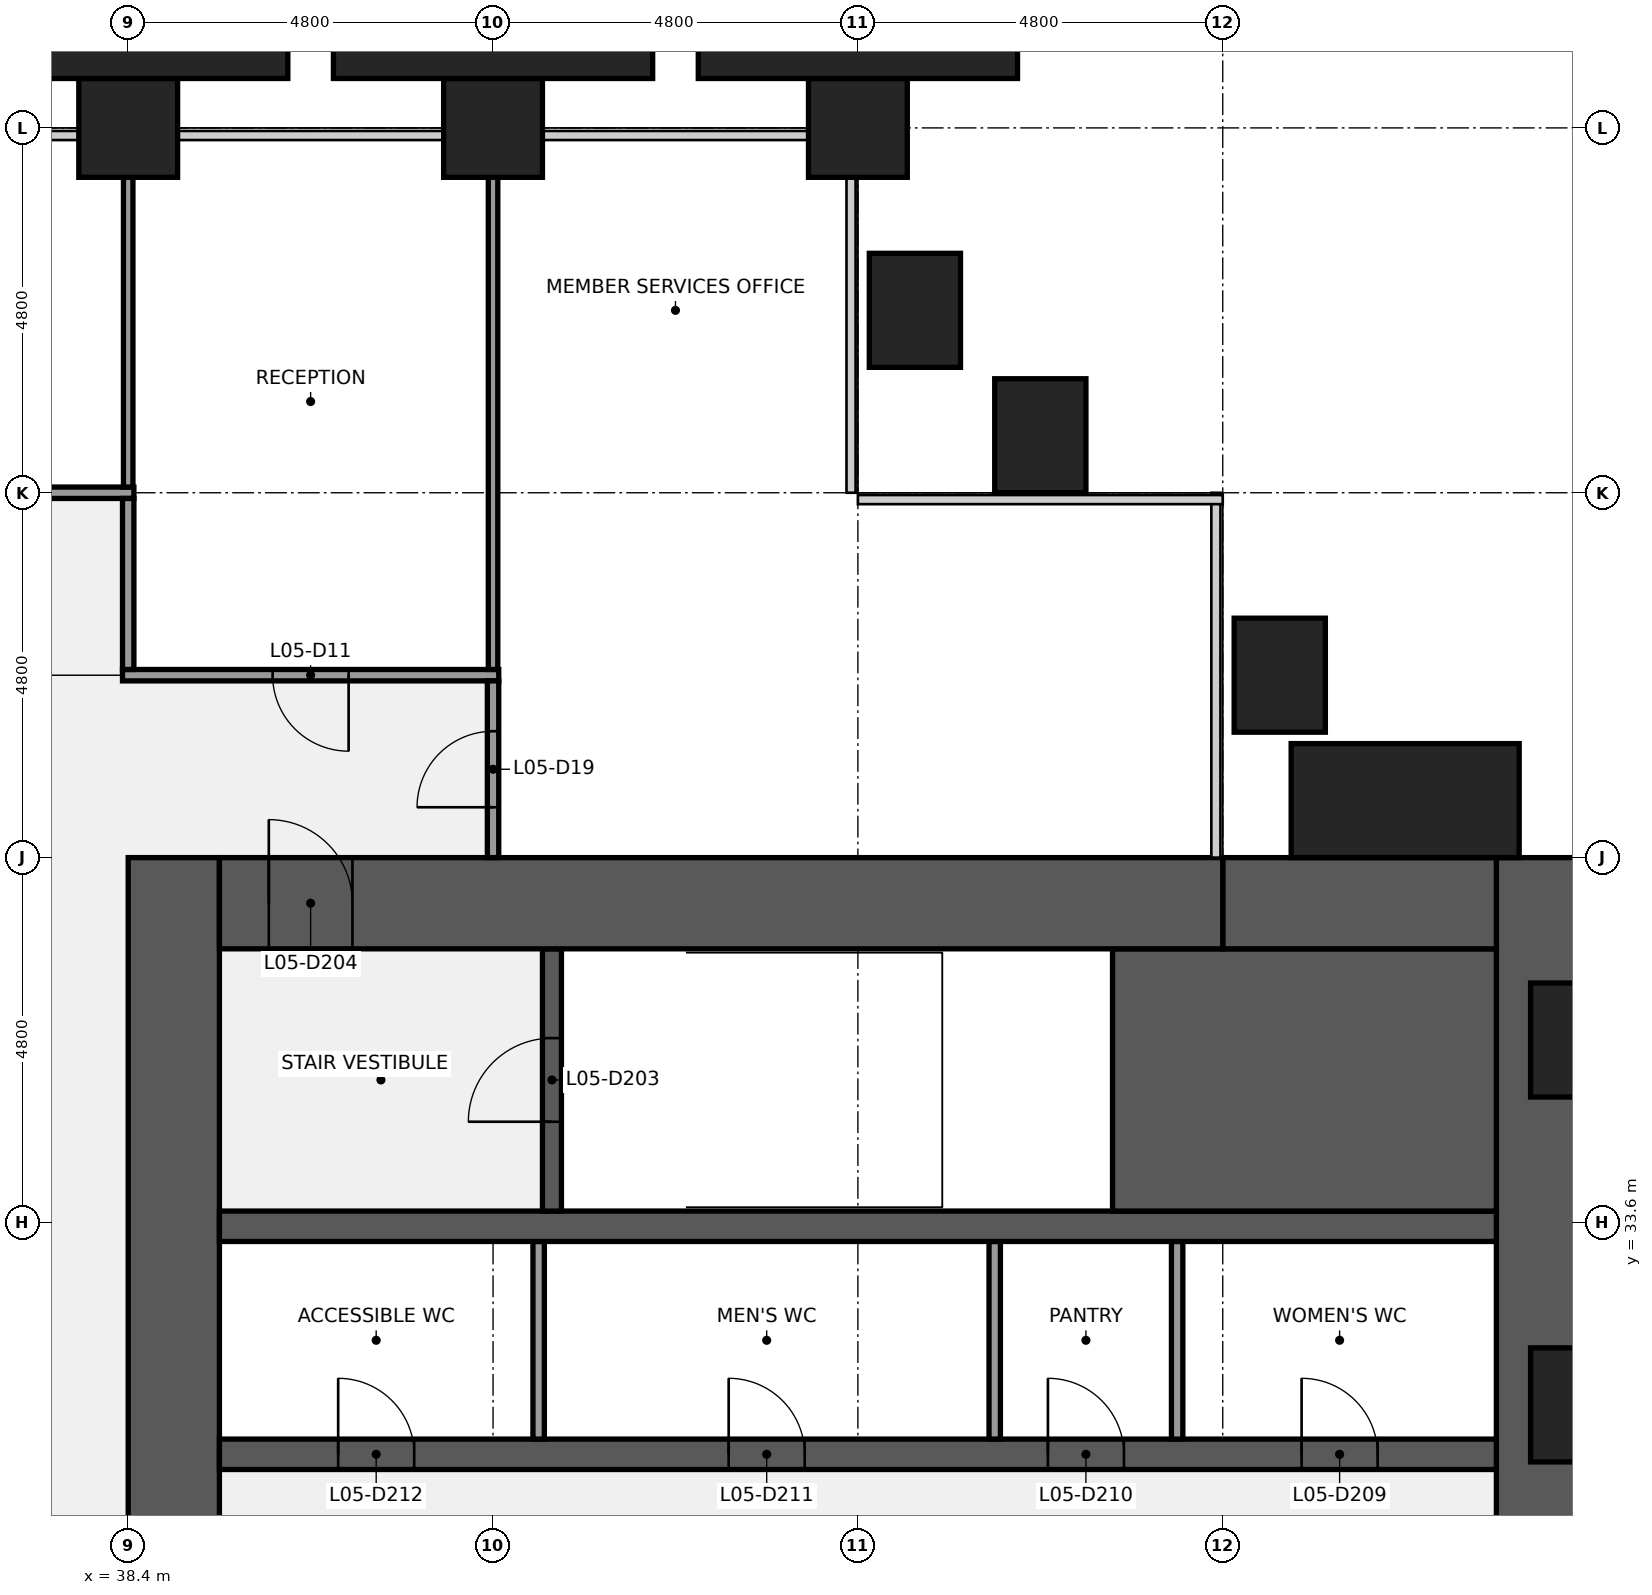
"""IFC4 building model, lengths in metres.
Left out: names, types, materials, properties, quantities, classifications, styles, units other than length and angle.
Written with IfcOpenShell. Run it as: python <this file> out.ifc"""

import sys

from ifc_helpers import new_model, si_unit, direction, frame, frame_2d, origin, origin_2d, place, context, subcontext, project, spatial, rectangle, extrude, element, fill, save


model = new_model("IFC4")
c1 = context("Model", 3, precision=1e-05, world=origin(), true_north=direction((0.0, 1.0)))
c2 = subcontext(c1, "Body", "Model", "MODEL_VIEW")
j1 = project(units=[si_unit("LENGTHUNIT", "METRE"), si_unit("PLANEANGLEUNIT", "RADIAN")], contexts=[c1])
p1 = place(None, origin())
s1 = spatial("IfcSite", under=j1, at=p1, CompositionType="ELEMENT")
p2 = place(p1, origin())
s2 = spatial("IfcBuilding", under=s1, at=p2, CompositionType="ELEMENT")
p3 = place(p2, frame((0.0, 0.0, 30.2)))
s3 = spatial("IfcBuildingStorey", under=s2, at=p3, CompositionType="ELEMENT", Elevation=30.2)
for number, where, z_axis, x_axis in (
    (1, (38.4, 48.0, 0.0), (0.0, 0.0, 1.0), (1.0, 0.0, 0.0)),
    (2, (43.2, 48.0, 0.0), (0.0, 0.0, 1.0), (1.0, 0.0, 0.0)),
    (3, (48.0, 48.0, 0.0), (0.0, 0.0, 1.0), (1.0, 0.0, 0.0)),
):
    element("IfcColumn", number, at=place(p3, frame(where, z_axis=z_axis, x_axis=x_axis)), inside=s3, PredefinedType="COLUMN", context=c2, shape_type="SweptSolid", body=[
        extrude(rectangle(XDim=1.3, YDim=1.3, at=origin_2d()), origin(), (0.0, 0.0, 1.0), 4.4),
    ])
p4 = place(p3, frame((57.0, 38.4, 0.0), z_axis=(0.0, 0.0, 1.0), x_axis=(0.0, -1.0, 0.0)))
e4 = element("IfcWall", 4, at=p4, inside=s3, PredefinedType="SHEAR", context=c2, shape_type="SweptSolid", body=[
    extrude(rectangle(XDim=28.8, YDim=1.2, at=frame_2d((14.4, 0.0))), origin(), (0.0, 0.0, 1.0), 4.24),
])
p5 = place(p4, frame((18.45, 0.0, 0.9)))
e5 = element("IfcOpeningElement", 5, at=p5, cuts=e4, PredefinedType="OPENING", context=c2, shape_type="SweptSolid", body=[
    extrude(rectangle(XDim=1.5, YDim=1.5, at=frame_2d((0.75, 0.75))), frame((0.0, 0.61, 0.0), z_axis=(0.0, -1.0, 0.0), x_axis=(1.0, 0.0, 0.0)), (0.0, 0.0, 1.0), 1.22),
])
p6 = place(p4, frame((8.85, 0.0, 0.9)))
e6 = element("IfcOpeningElement", 6, at=p6, cuts=e4, PredefinedType="OPENING", context=c2, shape_type="SweptSolid", body=[
    extrude(rectangle(XDim=1.5, YDim=1.5, at=frame_2d((0.75, 0.75))), frame((0.0, 0.61, 0.0), z_axis=(0.0, -1.0, 0.0), x_axis=(1.0, 0.0, 0.0)), (0.0, 0.0, 1.0), 1.22),
])
p7 = place(p3, frame((39.0, 9.6, 0.0), z_axis=(0.0, 0.0, 1.0), x_axis=(0.0, 1.0, 0.0)))
e7 = element("IfcWall", 7, at=p7, inside=s3, PredefinedType="SHEAR", context=c2, shape_type="SweptSolid", body=[
    extrude(rectangle(XDim=28.8, YDim=1.2, at=frame_2d((14.4, 0.0))), origin(), (0.0, 0.0, 1.0), 4.24),
])
p8 = place(p7, frame((8.7, 0.0, 0.0)))
e8 = element("IfcOpeningElement", 8, at=p8, cuts=e7, PredefinedType="OPENING", context=c2, shape_type="SweptSolid", body=[
    extrude(rectangle(XDim=1.8, YDim=2.1, at=frame_2d((0.9, 1.05))), frame((0.0, 0.61, 0.0), z_axis=(0.0, -1.0, 0.0), x_axis=(1.0, 0.0, 0.0)), (0.0, 0.0, 1.0), 1.22),
])
p9 = place(p7, frame((18.3, 0.0, 0.0)))
e9 = element("IfcOpeningElement", 9, at=p9, cuts=e7, PredefinedType="OPENING", context=c2, shape_type="SweptSolid", body=[
    extrude(rectangle(XDim=1.8, YDim=2.1, at=frame_2d((0.9, 1.05))), frame((0.0, 0.61, 0.0), z_axis=(0.0, -1.0, 0.0), x_axis=(1.0, 0.0, 0.0)), (0.0, 0.0, 1.0), 1.22),
])
p10 = place(p3, frame((39.6, 30.55, 0.0), z_axis=(0.0, 0.0, 1.0), x_axis=(1.0, 0.0, 0.0)))
e10 = element("IfcWall", 10, at=p10, inside=s3, PredefinedType="SHEAR", context=c2, shape_type="SweptSolid", body=[
    extrude(rectangle(XDim=16.8, YDim=0.4, at=frame_2d((8.4, 0.0))), origin(), (0.0, 0.0, 1.0), 4.24),
])
p11 = place(p10, frame((14.238, 0.0, 0.0)))
e11 = element("IfcOpeningElement", 11, at=p11, cuts=e10, PredefinedType="OPENING", context=c2, shape_type="SweptSolid", body=[
    extrude(rectangle(XDim=1.0, YDim=2.1, at=frame_2d((0.5, 1.05))), frame((0.0, 0.21, 0.0), z_axis=(0.0, -1.0, 0.0), x_axis=(1.0, 0.0, 0.0)), (0.0, 0.0, 1.0), 0.42),
])
p12 = place(p10, frame((10.9, 0.0, 0.0)))
e12 = element("IfcOpeningElement", 12, at=p12, cuts=e10, PredefinedType="OPENING", context=c2, shape_type="SweptSolid", body=[
    extrude(rectangle(XDim=1.0, YDim=2.1, at=frame_2d((0.5, 1.05))), frame((0.0, 0.21, 0.0), z_axis=(0.0, -1.0, 0.0), x_axis=(1.0, 0.0, 0.0)), (0.0, 0.0, 1.0), 0.42),
])
p13 = place(p10, frame((6.7, 0.0, 0.0)))
e13 = element("IfcOpeningElement", 13, at=p13, cuts=e10, PredefinedType="OPENING", context=c2, shape_type="SweptSolid", body=[
    extrude(rectangle(XDim=1.0, YDim=2.1, at=frame_2d((0.5, 1.05))), frame((0.0, 0.21, 0.0), z_axis=(0.0, -1.0, 0.0), x_axis=(1.0, 0.0, 0.0)), (0.0, 0.0, 1.0), 0.42),
])
p14 = place(p10, frame((1.562, 0.0, 0.0)))
e14 = element("IfcOpeningElement", 14, at=p14, cuts=e10, PredefinedType="OPENING", context=c2, shape_type="SweptSolid", body=[
    extrude(rectangle(XDim=1.0, YDim=2.1, at=frame_2d((0.5, 1.05))), frame((0.0, 0.21, 0.0), z_axis=(0.0, -1.0, 0.0), x_axis=(1.0, 0.0, 0.0)), (0.0, 0.0, 1.0), 0.42),
])
for number, where, z_axis, x_axis in (
    (15, (52.2, 30.75, 0.0), (0.0, 0.0, 1.0), (0.0, 1.0, 0.0)),
    (16, (49.8, 30.75, 0.0), (0.0, 0.0, 1.0), (0.0, 1.0, 0.0)),
    (17, (43.8, 30.75, 0.0), (0.0, 0.0, 1.0), (0.0, 1.0, 0.0)),
):
    element("IfcWall", number, at=place(p3, frame(where, z_axis=z_axis, x_axis=x_axis)), inside=s3, PredefinedType="PARTITIONING", context=c2, shape_type="SweptSolid", body=[
        extrude(rectangle(XDim=2.6, YDim=0.15, at=frame_2d((1.3, 0.0))), origin(), (0.0, 0.0, 1.0), 4.24),
    ])
p15 = place(p3, frame((39.6, 33.55, 0.0), z_axis=(0.0, 0.0, 1.0), x_axis=(1.0, 0.0, 0.0)))
e18 = element("IfcWall", 18, at=p15, inside=s3, PredefinedType="SHEAR", context=c2, shape_type="SweptSolid", body=[
    extrude(rectangle(XDim=16.8, YDim=0.4, at=frame_2d((8.4, 0.0))), origin(), (0.0, 0.0, 1.0), 4.24),
])
p16 = place(p3, frame((51.35, 35.475, 0.0), z_axis=(0.0, 0.0, 1.0), x_axis=(1.0, 0.0, 0.0)))
e19 = element("IfcWall", 19, at=p16, inside=s3, PredefinedType="SHEAR", context=c2, shape_type="SweptSolid", body=[
    extrude(rectangle(XDim=5.05, YDim=3.45, at=frame_2d((2.525, 0.0))), origin(), (0.0, 0.0, 1.0), 4.24),
])
p17 = place(p3, frame((43.975, 33.75, 0.0), z_axis=(0.0, 0.0, 1.0), x_axis=(0.0, 1.0, 0.0)))
e20 = element("IfcWall", 20, at=p17, inside=s3, PredefinedType="SHEAR", context=c2, shape_type="SweptSolid", body=[
    extrude(rectangle(XDim=3.45, YDim=0.25, at=frame_2d((1.725, 0.0))), origin(), (0.0, 0.0, 1.0), 4.24),
])
p18 = place(p17, frame((1.175, 0.0, 0.0)))
e21 = element("IfcOpeningElement", 21, at=p18, cuts=e20, PredefinedType="OPENING", context=c2, shape_type="SweptSolid", body=[
    extrude(rectangle(XDim=1.1, YDim=2.1, at=frame_2d((0.55, 1.05))), frame((0.0, 0.135, 0.0), z_axis=(0.0, -1.0, 0.0), x_axis=(1.0, 0.0, 0.0)), (0.0, 0.0, 1.0), 0.27),
])
p19 = place(p3, frame((52.8, 37.8, 0.0), z_axis=(0.0, 0.0, 1.0), x_axis=(1.0, 0.0, 0.0)))
e22 = element("IfcWall", 22, at=p19, inside=s3, PredefinedType="SHEAR", context=c2, shape_type="SweptSolid", body=[
    extrude(rectangle(XDim=3.6, YDim=1.2, at=frame_2d((1.8, 0.0))), origin(), (0.0, 0.0, 1.0), 4.24),
])
p20 = place(p3, frame((39.6, 37.8, 0.0), z_axis=(0.0, 0.0, 1.0), x_axis=(1.0, 0.0, 0.0)))
e23 = element("IfcWall", 23, at=p20, inside=s3, PredefinedType="SHEAR", context=c2, shape_type="SweptSolid", body=[
    extrude(rectangle(XDim=13.2, YDim=1.2, at=frame_2d((6.6, 0.0))), origin(), (0.0, 0.0, 1.0), 4.24),
])
p21 = place(p20, frame((0.65, 0.0, 0.0)))
e24 = element("IfcOpeningElement", 24, at=p21, cuts=e23, PredefinedType="OPENING", context=c2, shape_type="SweptSolid", body=[
    extrude(rectangle(XDim=1.1, YDim=2.1, at=frame_2d((0.55, 1.05))), frame((0.0, 0.61, 0.0), z_axis=(0.0, -1.0, 0.0), x_axis=(1.0, 0.0, 0.0)), (0.0, 0.0, 1.0), 1.22),
])
p22 = place(p3, frame((38.325, 40.8, 0.0), z_axis=(0.0, 0.0, 1.0), x_axis=(1.0, 0.0, 0.0)))
e25 = element("IfcWall", 25, at=p22, inside=s3, PredefinedType="PARTITIONING", context=c2, shape_type="SweptSolid", body=[
    extrude(rectangle(XDim=4.95, YDim=0.15, at=frame_2d((2.475, 0.0))), origin(), (0.0, 0.0, 1.0), 3.25),
])
p23 = place(p22, frame((1.975, 0.0, 0.0)))
e26 = element("IfcOpeningElement", 26, at=p23, cuts=e25, PredefinedType="OPENING", context=c2, shape_type="SweptSolid", body=[
    extrude(rectangle(XDim=1.0, YDim=2.1, at=frame_2d((0.5, 1.05))), frame((0.0, 0.085, 0.0), z_axis=(0.0, -1.0, 0.0), x_axis=(1.0, 0.0, 0.0)), (0.0, 0.0, 1.0), 0.17),
])
p24 = place(p3, frame((19.125, 43.2, 0.0), z_axis=(0.0, 0.0, 1.0), x_axis=(1.0, 0.0, 0.0)))
e27 = element("IfcWall", 27, at=p24, inside=s3, PredefinedType="PARTITIONING", context=c2, shape_type="SweptSolid", body=[
    extrude(rectangle(XDim=19.35, YDim=0.15, at=frame_2d((9.675, 0.0))), origin(), (0.0, 0.0, 1.0), 3.25),
])
p25 = place(p24, frame((9.175, 0.0, 0.0)))
e28 = element("IfcOpeningElement", 28, at=p25, cuts=e27, PredefinedType="OPENING", context=c2, shape_type="SweptSolid", body=[
    extrude(rectangle(XDim=1.0, YDim=2.1, at=frame_2d((0.5, 1.05))), frame((0.0, 0.085, 0.0), z_axis=(0.0, -1.0, 0.0), x_axis=(1.0, 0.0, 0.0)), (0.0, 0.0, 1.0), 0.17),
])
p26 = place(p3, frame((38.4, 43.275, 0.0), z_axis=(0.0, 0.0, 1.0), x_axis=(0.0, 1.0, 0.0)))
e29 = element("IfcWall", 29, at=p26, inside=s3, PredefinedType="PARTITIONING", context=c2, shape_type="SweptSolid", body=[
    extrude(rectangle(XDim=4.075, YDim=0.125, at=frame_2d((2.038, 0.0))), origin(), (0.0, 0.0, 1.0), 3.25),
])
p27 = place(p3, frame((38.4, 40.875, 0.0), z_axis=(0.0, 0.0, 1.0), x_axis=(0.0, 1.0, 0.0)))
e30 = element("IfcWall", 30, at=p27, inside=s3, PredefinedType="PARTITIONING", context=c2, shape_type="SweptSolid", body=[
    extrude(rectangle(XDim=2.25, YDim=0.15, at=frame_2d((1.125, 0.0))), origin(), (0.0, 0.0, 1.0), 3.25),
])
p28 = place(p3, frame((43.2, 40.875, 0.0), z_axis=(0.0, 0.0, 1.0), x_axis=(0.0, 1.0, 0.0)))
e31 = element("IfcWall", 31, at=p28, inside=s3, PredefinedType="PARTITIONING", context=c2, shape_type="SweptSolid", body=[
    extrude(rectangle(XDim=6.475, YDim=0.125, at=frame_2d((3.238, 0.0))), origin(), (0.0, 0.0, 1.0), 3.25),
])
p29 = place(p3, frame((43.2, 38.4, 0.0), z_axis=(0.0, 0.0, 1.0), x_axis=(0.0, 1.0, 0.0)))
e32 = element("IfcWall", 32, at=p29, inside=s3, PredefinedType="PARTITIONING", context=c2, shape_type="SweptSolid", body=[
    extrude(rectangle(XDim=2.325, YDim=0.15, at=frame_2d((1.163, 0.0))), origin(), (0.0, 0.0, 1.0), 3.25),
])
p30 = place(p29, frame((0.663, 0.0, 0.0)))
e33 = element("IfcOpeningElement", 33, at=p30, cuts=e32, PredefinedType="OPENING", context=c2, shape_type="SweptSolid", body=[
    extrude(rectangle(XDim=1.0, YDim=2.1, at=frame_2d((0.5, 1.05))), frame((0.0, 0.085, 0.0), z_axis=(0.0, -1.0, 0.0), x_axis=(1.0, 0.0, 0.0)), (0.0, 0.0, 1.0), 0.17),
])
for number, where, z_axis, x_axis in (
    (34, (53.55, 40.8, 0.0), (0.0, 0.0, 1.0), (0.0, 1.0, 0.0)),
    (35, (50.4, 43.95, 0.0), (0.0, 0.0, 1.0), (1.0, 0.0, 0.0)),
    (36, (48.75, 45.6, 0.0), (0.0, 0.0, 1.0), (0.0, 1.0, 0.0)),
):
    element("IfcColumn", number, at=place(p3, frame(where, z_axis=z_axis, x_axis=x_axis)), inside=s3, PredefinedType="PILASTER", context=c2, shape_type="SweptSolid", body=[
        extrude(rectangle(XDim=1.2, YDim=1.5, at=origin_2d()), origin(), (0.0, 0.0, 1.0), 4.1),
    ])
p31 = place(p3, frame((55.2, 39.15, 0.0), z_axis=(0.0, 0.0, 1.0), x_axis=(1.0, 0.0, 0.0)))
e37 = element("IfcColumn", 37, at=p31, inside=s3, PredefinedType="PILASTER", context=c2, shape_type="SweptSolid", body=[
    extrude(rectangle(XDim=3.0, YDim=1.5, at=origin_2d()), origin(), (0.0, 0.0, 1.0), 4.4),
])
for number, where, z_axis, x_axis in (
    (38, (38.4, 49.075, 0.0), (0.0, 0.0, 1.0), (1.0, 0.0, 0.0)),
    (39, (43.2, 49.075, 0.0), (0.0, 0.0, 1.0), (1.0, 0.0, 0.0)),
    (40, (48.0, 49.075, 0.0), (0.0, 0.0, 1.0), (1.0, 0.0, 0.0)),
):
    element("IfcColumn", number, at=place(p3, frame(where, z_axis=z_axis, x_axis=x_axis)), inside=s3, PredefinedType="PILASTER", context=c2, shape_type="SweptSolid", body=[
        extrude(rectangle(XDim=4.2, YDim=0.85, at=origin_2d()), origin(), (0.0, 0.0, 1.0), 4.4),
    ])
p32 = place(p18, origin())
e41 = element("IfcDoor", 41, at=p32, inside=s3, OperationType="SINGLE_SWING_LEFT", PredefinedType="DOOR", context=c2, shape_type="SweptSolid", body=[
    extrude(rectangle(XDim=1.1, YDim=2.1, at=frame_2d((0.55, 1.05))), frame((0.0, 0.025, 0.0), z_axis=(0.0, -1.0, 0.0), x_axis=(1.0, 0.0, 0.0)), (0.0, 0.0, 1.0), 0.05),
])
fill(e21, e41)
p33 = place(p21, origin())
e42 = element("IfcDoor", 42, at=p33, inside=s3, OperationType="SINGLE_SWING_LEFT", PredefinedType="DOOR", context=c2, shape_type="SweptSolid", body=[
    extrude(rectangle(XDim=1.1, YDim=2.1, at=frame_2d((0.55, 1.05))), frame((0.0, 0.025, 0.0), z_axis=(0.0, -1.0, 0.0), x_axis=(1.0, 0.0, 0.0)), (0.0, 0.0, 1.0), 0.05),
])
fill(e24, e42)
p34 = place(p11, origin())
e43 = element("IfcDoor", 43, at=p34, inside=s3, OperationType="SINGLE_SWING_LEFT", PredefinedType="DOOR", context=c2, shape_type="SweptSolid", body=[
    extrude(rectangle(XDim=1.0, YDim=2.1, at=frame_2d((0.5, 1.05))), frame((0.0, 0.025, 0.0), z_axis=(0.0, -1.0, 0.0), x_axis=(1.0, 0.0, 0.0)), (0.0, 0.0, 1.0), 0.05),
])
fill(e11, e43)
p35 = place(p12, origin())
e44 = element("IfcDoor", 44, at=p35, inside=s3, OperationType="SINGLE_SWING_LEFT", PredefinedType="DOOR", context=c2, shape_type="SweptSolid", body=[
    extrude(rectangle(XDim=1.0, YDim=2.1, at=frame_2d((0.5, 1.05))), frame((0.0, 0.025, 0.0), z_axis=(0.0, -1.0, 0.0), x_axis=(1.0, 0.0, 0.0)), (0.0, 0.0, 1.0), 0.05),
])
fill(e12, e44)
p36 = place(p13, origin())
e45 = element("IfcDoor", 45, at=p36, inside=s3, OperationType="SINGLE_SWING_LEFT", PredefinedType="DOOR", context=c2, shape_type="SweptSolid", body=[
    extrude(rectangle(XDim=1.0, YDim=2.1, at=frame_2d((0.5, 1.05))), frame((0.0, 0.025, 0.0), z_axis=(0.0, -1.0, 0.0), x_axis=(1.0, 0.0, 0.0)), (0.0, 0.0, 1.0), 0.05),
])
fill(e13, e45)
p37 = place(p14, origin())
e46 = element("IfcDoor", 46, at=p37, inside=s3, OperationType="SINGLE_SWING_LEFT", PredefinedType="DOOR", context=c2, shape_type="SweptSolid", body=[
    extrude(rectangle(XDim=1.0, YDim=2.1, at=frame_2d((0.5, 1.05))), frame((0.0, 0.025, 0.0), z_axis=(0.0, -1.0, 0.0), x_axis=(1.0, 0.0, 0.0)), (0.0, 0.0, 1.0), 0.05),
])
fill(e14, e46)
p38 = place(p23, origin())
e47 = element("IfcDoor", 47, at=p38, inside=s3, OperationType="SINGLE_SWING_RIGHT", PredefinedType="DOOR", context=c2, shape_type="SweptSolid", body=[
    extrude(rectangle(XDim=1.0, YDim=2.1, at=frame_2d((0.5, 1.05))), frame((0.0, 0.025, 0.0), z_axis=(0.0, -1.0, 0.0), x_axis=(1.0, 0.0, 0.0)), (0.0, 0.0, 1.0), 0.05),
])
fill(e26, e47)
p39 = place(p30, origin())
e48 = element("IfcDoor", 48, at=p39, inside=s3, OperationType="SINGLE_SWING_LEFT", PredefinedType="DOOR", context=c2, shape_type="SweptSolid", body=[
    extrude(rectangle(XDim=1.0, YDim=2.1, at=frame_2d((0.5, 1.05))), frame((0.0, 0.025, 0.0), z_axis=(0.0, -1.0, 0.0), x_axis=(1.0, 0.0, 0.0)), (0.0, 0.0, 1.0), 0.05),
])
fill(e33, e48)
save(model, sys.argv[1])
